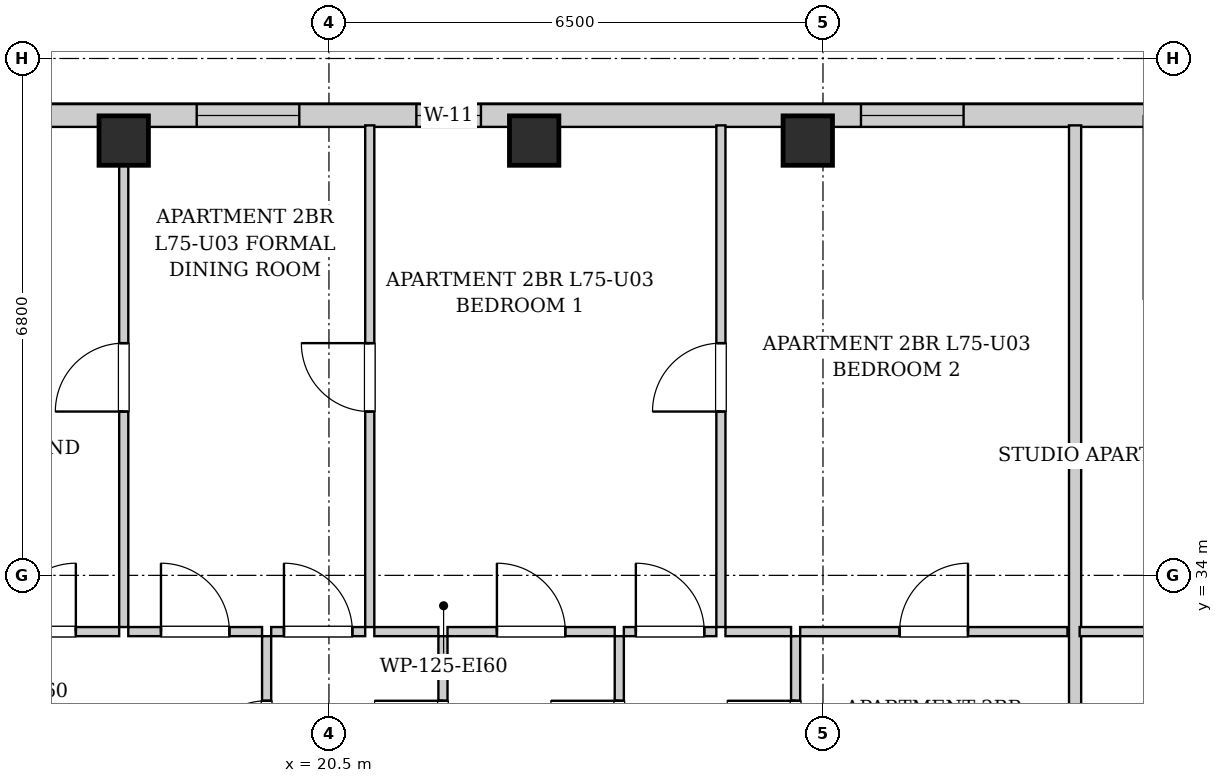
"""IFC4 building model, lengths in metres.
Left out: names, types, materials, properties, quantities, classifications, styles, units other than length and angle.
Written with IfcOpenShell. Run it as: python <this file> out.ifc"""

import sys

from ifc_helpers import new_model, si_unit, direction, frame, frame_2d, origin, origin_2d, place, context, subcontext, project, spatial, rectangle, extrude, element, fill, save


model = new_model("IFC4")
c1 = context("Model", 3, precision=1e-05, world=origin(), true_north=direction((0.0, 1.0)))
c2 = subcontext(c1, "Body", "Model", "MODEL_VIEW")
j1 = project(units=[si_unit("LENGTHUNIT", "METRE"), si_unit("PLANEANGLEUNIT", "RADIAN")], contexts=[c1])
p1 = place(None, origin())
s1 = spatial("IfcSite", under=j1, at=p1, CompositionType="ELEMENT")
p2 = place(p1, origin())
s2 = spatial("IfcBuilding", under=s1, at=p2, CompositionType="ELEMENT")
p3 = place(p2, frame((0.0, 0.0, 258.1)))
s3 = spatial("IfcBuildingStorey", under=s2, at=p3, CompositionType="ELEMENT", Elevation=258.1)
for number, where, z_axis, x_axis in (
    (1, (17.8, 39.72, 0.0), (0.0, 0.0, 1.0), (1.0, 0.0, 0.0)),
    (2, (23.2, 39.72, 0.0), (0.0, 0.0, 1.0), (1.0, 0.0, 0.0)),
    (3, (26.8, 39.72, 0.0), (0.0, 0.0, 1.0), (1.0, 0.0, 0.0)),
):
    element("IfcColumn", number, at=place(p3, frame(where, z_axis=z_axis, x_axis=x_axis)), inside=s3, PredefinedType="COLUMN", context=c2, shape_type="SweptSolid", body=[
        extrude(rectangle(XDim=0.65, YDim=0.65, at=origin_2d()), origin(), (0.0, 0.0, 1.0), 3.4),
    ])
p4 = place(p3, frame((13.1, 40.05, 0.0), z_axis=(0.0, 0.0, 1.0), x_axis=(1.0, 0.0, 0.0)))
e4 = element("IfcWall", 4, at=p4, inside=s3, PredefinedType="SOLIDWALL", context=c2, shape_type="SweptSolid", body=[
    extrude(rectangle(XDim=18.25, YDim=0.3, at=frame_2d((9.125, 0.0))), origin(), (0.0, 0.0, 1.0), 3.05),
])
p5 = place(p4, frame((1.813, 0.0, 0.55)))
e5 = element("IfcOpeningElement", 5, at=p5, cuts=e4, PredefinedType="OPENING", context=c2, shape_type="SweptSolid", body=[
    extrude(rectangle(XDim=1.35, YDim=1.2, at=frame_2d((0.675, 0.6))), frame((0.0, 0.16, 0.0), z_axis=(0.0, -1.0, 0.0), x_axis=(1.0, 0.0, 0.0)), (0.0, 0.0, 1.0), 0.32),
])
p6 = place(p4, frame((5.66, 0.0, 0.55)))
e6 = element("IfcOpeningElement", 6, at=p6, cuts=e4, PredefinedType="OPENING", context=c2, shape_type="SweptSolid", body=[
    extrude(rectangle(XDim=1.35, YDim=1.2, at=frame_2d((0.675, 0.6))), frame((0.0, 0.16, 0.0), z_axis=(0.0, -1.0, 0.0), x_axis=(1.0, 0.0, 0.0)), (0.0, 0.0, 1.0), 0.32),
])
p7 = place(p4, frame((8.55, 0.0, 0.55)))
e7 = element("IfcOpeningElement", 7, at=p7, cuts=e4, PredefinedType="OPENING", context=c2, shape_type="SweptSolid", body=[
    extrude(rectangle(XDim=0.85, YDim=1.2, at=frame_2d((0.425, 0.6))), frame((0.0, 0.16, 0.0), z_axis=(0.0, -1.0, 0.0), x_axis=(1.0, 0.0, 0.0)), (0.0, 0.0, 1.0), 0.32),
])
p8 = place(p4, frame((14.4, 0.0, 0.55)))
e8 = element("IfcOpeningElement", 8, at=p8, cuts=e4, PredefinedType="OPENING", context=c2, shape_type="SweptSolid", body=[
    extrude(rectangle(XDim=1.35, YDim=1.2, at=frame_2d((0.675, 0.6))), frame((0.0, 0.16, 0.0), z_axis=(0.0, -1.0, 0.0), x_axis=(1.0, 0.0, 0.0)), (0.0, 0.0, 1.0), 0.32),
])
p9 = place(p3, frame((19.68, 30.6, 0.0), z_axis=(0.0, 0.0, 1.0), x_axis=(0.0, 1.0, 0.0)))
e9 = element("IfcWall", 9, at=p9, inside=s3, PredefinedType="PARTITIONING", context=c2, shape_type="SweptSolid", body=[
    extrude(rectangle(XDim=2.6, YDim=0.12, at=frame_2d((1.3, 0.0))), origin(), (0.0, 0.0, 1.0), 3.05),
])
p10 = place(p9, frame((0.85, 0.0, 0.0)))
e10 = element("IfcOpeningElement", 10, at=p10, cuts=e9, PredefinedType="OPENING", context=c2, shape_type="SweptSolid", body=[
    extrude(rectangle(XDim=0.9, YDim=2.05, at=frame_2d((0.45, 1.025))), frame((0.0, 0.07, 0.0), z_axis=(0.0, -1.0, 0.0), x_axis=(1.0, 0.0, 0.0)), (0.0, 0.0, 1.0), 0.14),
])
p11 = place(p3, frame((15.7, 33.26, 0.0), z_axis=(0.0, 0.0, 1.0), x_axis=(1.0, 0.0, 0.0)))
e11 = element("IfcWall", 11, at=p11, inside=s3, PredefinedType="PARTITIONING", context=c2, shape_type="SweptSolid", body=[
    extrude(rectangle(XDim=2.04, YDim=0.12, at=frame_2d((1.02, 0.0))), origin(), (0.0, 0.0, 1.0), 3.05),
])
p12 = place(p11, frame((0.57, 0.0, 0.0)))
e12 = element("IfcOpeningElement", 12, at=p12, cuts=e11, PredefinedType="OPENING", context=c2, shape_type="SweptSolid", body=[
    extrude(rectangle(XDim=0.9, YDim=2.05, at=frame_2d((0.45, 1.025))), frame((0.0, 0.07, 0.0), z_axis=(0.0, -1.0, 0.0), x_axis=(1.0, 0.0, 0.0)), (0.0, 0.0, 1.0), 0.14),
])
p13 = place(p3, frame((17.86, 33.26, 0.0), z_axis=(0.0, 0.0, 1.0), x_axis=(1.0, 0.0, 0.0)))
e13 = element("IfcWall", 13, at=p13, inside=s3, PredefinedType="PARTITIONING", context=c2, shape_type="SweptSolid", body=[
    extrude(rectangle(XDim=1.76, YDim=0.12, at=frame_2d((0.88, 0.0))), origin(), (0.0, 0.0, 1.0), 3.05),
])
p14 = place(p13, frame((0.43, 0.0, 0.0)))
e14 = element("IfcOpeningElement", 14, at=p14, cuts=e13, PredefinedType="OPENING", context=c2, shape_type="SweptSolid", body=[
    extrude(rectangle(XDim=0.9, YDim=2.05, at=frame_2d((0.45, 1.025))), frame((0.0, 0.07, 0.0), z_axis=(0.0, -1.0, 0.0), x_axis=(1.0, 0.0, 0.0)), (0.0, 0.0, 1.0), 0.14),
])
p15 = place(p3, frame((22.0, 30.6, 0.0), z_axis=(0.0, 0.0, 1.0), x_axis=(0.0, 1.0, 0.0)))
e15 = element("IfcWall", 15, at=p15, inside=s3, PredefinedType="PARTITIONING", context=c2, shape_type="SweptSolid", body=[
    extrude(rectangle(XDim=2.6, YDim=0.12, at=frame_2d((1.3, 0.0))), origin(), (0.0, 0.0, 1.0), 3.05),
])
p16 = place(p15, frame((0.85, 0.0, 0.0)))
e16 = element("IfcOpeningElement", 16, at=p16, cuts=e15, PredefinedType="OPENING", context=c2, shape_type="SweptSolid", body=[
    extrude(rectangle(XDim=0.9, YDim=2.05, at=frame_2d((0.45, 1.025))), frame((0.0, 0.07, 0.0), z_axis=(0.0, -1.0, 0.0), x_axis=(1.0, 0.0, 0.0)), (0.0, 0.0, 1.0), 0.14),
])
p17 = place(p3, frame((19.74, 33.26, 0.0), z_axis=(0.0, 0.0, 1.0), x_axis=(1.0, 0.0, 0.0)))
e17 = element("IfcWall", 17, at=p17, inside=s3, PredefinedType="PARTITIONING", context=c2, shape_type="SweptSolid", body=[
    extrude(rectangle(XDim=1.237, YDim=0.12, at=frame_2d((0.619, 0.0))), origin(), (0.0, 0.0, 1.0), 3.05),
])
p18 = place(p17, frame((0.168, 0.0, 0.0)))
e18 = element("IfcOpeningElement", 18, at=p18, cuts=e17, PredefinedType="OPENING", context=c2, shape_type="SweptSolid", body=[
    extrude(rectangle(XDim=0.9, YDim=2.05, at=frame_2d((0.45, 1.025))), frame((0.0, 0.07, 0.0), z_axis=(0.0, -1.0, 0.0), x_axis=(1.0, 0.0, 0.0)), (0.0, 0.0, 1.0), 0.14),
])
p19 = place(p3, frame((21.097, 33.26, 0.0), z_axis=(0.0, 0.0, 1.0), x_axis=(1.0, 0.0, 0.0)))
e19 = element("IfcWall", 19, at=p19, inside=s3, PredefinedType="PARTITIONING", context=c2, shape_type="SweptSolid", body=[
    extrude(rectangle(XDim=0.843, YDim=0.12, at=frame_2d((0.421, 0.0))), origin(), (0.0, 0.0, 1.0), 3.05),
])
p20 = place(p3, frame((24.32, 30.6, 0.0), z_axis=(0.0, 0.0, 1.0), x_axis=(0.0, 1.0, 0.0)))
e20 = element("IfcWall", 20, at=p20, inside=s3, PredefinedType="PARTITIONING", context=c2, shape_type="SweptSolid", body=[
    extrude(rectangle(XDim=2.6, YDim=0.12, at=frame_2d((1.3, 0.0))), origin(), (0.0, 0.0, 1.0), 3.05),
])
p21 = place(p20, frame((0.85, 0.0, 0.0)))
e21 = element("IfcOpeningElement", 21, at=p21, cuts=e20, PredefinedType="OPENING", context=c2, shape_type="SweptSolid", body=[
    extrude(rectangle(XDim=0.9, YDim=2.05, at=frame_2d((0.45, 1.025))), frame((0.0, 0.07, 0.0), z_axis=(0.0, -1.0, 0.0), x_axis=(1.0, 0.0, 0.0)), (0.0, 0.0, 1.0), 0.14),
])
p22 = place(p3, frame((22.06, 33.26, 0.0), z_axis=(0.0, 0.0, 1.0), x_axis=(1.0, 0.0, 0.0)))
e22 = element("IfcWall", 22, at=p22, inside=s3, PredefinedType="PARTITIONING", context=c2, shape_type="SweptSolid", body=[
    extrude(rectangle(XDim=2.2, YDim=0.12, at=frame_2d((1.1, 0.0))), origin(), (0.0, 0.0, 1.0), 3.05),
])
p23 = place(p22, frame((0.65, 0.0, 0.0)))
e23 = element("IfcOpeningElement", 23, at=p23, cuts=e22, PredefinedType="OPENING", context=c2, shape_type="SweptSolid", body=[
    extrude(rectangle(XDim=0.9, YDim=2.05, at=frame_2d((0.45, 1.025))), frame((0.0, 0.07, 0.0), z_axis=(0.0, -1.0, 0.0), x_axis=(1.0, 0.0, 0.0)), (0.0, 0.0, 1.0), 0.14),
])
p24 = place(p3, frame((26.64, 30.6, 0.0), z_axis=(0.0, 0.0, 1.0), x_axis=(0.0, 1.0, 0.0)))
e24 = element("IfcWall", 24, at=p24, inside=s3, PredefinedType="PARTITIONING", context=c2, shape_type="SweptSolid", body=[
    extrude(rectangle(XDim=2.6, YDim=0.12, at=frame_2d((1.3, 0.0))), origin(), (0.0, 0.0, 1.0), 3.05),
])
p25 = place(p24, frame((0.85, 0.0, 0.0)))
e25 = element("IfcOpeningElement", 25, at=p25, cuts=e24, PredefinedType="OPENING", context=c2, shape_type="SweptSolid", body=[
    extrude(rectangle(XDim=0.9, YDim=2.05, at=frame_2d((0.45, 1.025))), frame((0.0, 0.07, 0.0), z_axis=(0.0, -1.0, 0.0), x_axis=(1.0, 0.0, 0.0)), (0.0, 0.0, 1.0), 0.14),
])
p26 = place(p3, frame((24.38, 33.26, 0.0), z_axis=(0.0, 0.0, 1.0), x_axis=(1.0, 0.0, 0.0)))
e26 = element("IfcWall", 26, at=p26, inside=s3, PredefinedType="PARTITIONING", context=c2, shape_type="SweptSolid", body=[
    extrude(rectangle(XDim=1.217, YDim=0.12, at=frame_2d((0.608, 0.0))), origin(), (0.0, 0.0, 1.0), 3.05),
])
p27 = place(p26, frame((0.158, 0.0, 0.0)))
e27 = element("IfcOpeningElement", 27, at=p27, cuts=e26, PredefinedType="OPENING", context=c2, shape_type="SweptSolid", body=[
    extrude(rectangle(XDim=0.9, YDim=2.05, at=frame_2d((0.45, 1.025))), frame((0.0, 0.07, 0.0), z_axis=(0.0, -1.0, 0.0), x_axis=(1.0, 0.0, 0.0)), (0.0, 0.0, 1.0), 0.14),
])
p28 = place(p3, frame((25.717, 33.26, 0.0), z_axis=(0.0, 0.0, 1.0), x_axis=(1.0, 0.0, 0.0)))
e28 = element("IfcWall", 28, at=p28, inside=s3, PredefinedType="PARTITIONING", context=c2, shape_type="SweptSolid", body=[
    extrude(rectangle(XDim=0.863, YDim=0.12, at=frame_2d((0.432, 0.0))), origin(), (0.0, 0.0, 1.0), 3.05),
])
p29 = place(p3, frame((26.7, 33.26, 0.0), z_axis=(0.0, 0.0, 1.0), x_axis=(1.0, 0.0, 0.0)))
e29 = element("IfcWall", 29, at=p29, inside=s3, PredefinedType="PARTITIONING", context=c2, shape_type="SweptSolid", body=[
    extrude(rectangle(XDim=3.517, YDim=0.12, at=frame_2d((1.759, 0.0))), origin(), (0.0, 0.0, 1.0), 3.05),
])
p30 = place(p29, frame((1.308, 0.0, 0.0)))
e30 = element("IfcOpeningElement", 30, at=p30, cuts=e29, PredefinedType="OPENING", context=c2, shape_type="SweptSolid", body=[
    extrude(rectangle(XDim=0.9, YDim=2.05, at=frame_2d((0.45, 1.025))), frame((0.0, 0.07, 0.0), z_axis=(0.0, -1.0, 0.0), x_axis=(1.0, 0.0, 0.0)), (0.0, 0.0, 1.0), 0.14),
])
p31 = place(p3, frame((17.8, 33.32, 0.0), z_axis=(0.0, 0.0, 1.0), x_axis=(0.0, 1.0, 0.0)))
e31 = element("IfcWall", 31, at=p31, inside=s3, PredefinedType="PARTITIONING", context=c2, shape_type="SweptSolid", body=[
    extrude(rectangle(XDim=6.6, YDim=0.12, at=frame_2d((3.3, 0.0))), origin(), (0.0, 0.0, 1.0), 2.578),
])
p32 = place(p31, frame((2.835, 0.0, 0.0)))
e32 = element("IfcOpeningElement", 32, at=p32, cuts=e31, PredefinedType="OPENING", context=c2, shape_type="SweptSolid", body=[
    extrude(rectangle(XDim=0.9, YDim=2.05, at=frame_2d((0.45, 1.025))), frame((0.0, 0.07, 0.0), z_axis=(0.0, -1.0, 0.0), x_axis=(1.0, 0.0, 0.0)), (0.0, 0.0, 1.0), 0.14),
])
p33 = place(p3, frame((21.037, 33.32, 0.0), z_axis=(0.0, 0.0, 1.0), x_axis=(0.0, 1.0, 0.0)))
e33 = element("IfcWall", 33, at=p33, inside=s3, PredefinedType="PARTITIONING", context=c2, shape_type="SweptSolid", body=[
    extrude(rectangle(XDim=6.6, YDim=0.12, at=frame_2d((3.3, 0.0))), origin(), (0.0, 0.0, 1.0), 3.05),
])
p34 = place(p33, frame((2.835, 0.0, 0.0)))
e34 = element("IfcOpeningElement", 34, at=p34, cuts=e33, PredefinedType="OPENING", context=c2, shape_type="SweptSolid", body=[
    extrude(rectangle(XDim=0.9, YDim=2.05, at=frame_2d((0.45, 1.025))), frame((0.0, 0.07, 0.0), z_axis=(0.0, -1.0, 0.0), x_axis=(1.0, 0.0, 0.0)), (0.0, 0.0, 1.0), 0.14),
])
p35 = place(p3, frame((25.657, 33.32, 0.0), z_axis=(0.0, 0.0, 1.0), x_axis=(0.0, 1.0, 0.0)))
e35 = element("IfcWall", 35, at=p35, inside=s3, PredefinedType="PARTITIONING", context=c2, shape_type="SweptSolid", body=[
    extrude(rectangle(XDim=6.6, YDim=0.12, at=frame_2d((3.3, 0.0))), origin(), (0.0, 0.0, 1.0), 3.05),
])
p36 = place(p35, frame((2.835, 0.0, 0.0)))
e36 = element("IfcOpeningElement", 36, at=p36, cuts=e35, PredefinedType="OPENING", context=c2, shape_type="SweptSolid", body=[
    extrude(rectangle(XDim=0.9, YDim=2.05, at=frame_2d((0.45, 1.025))), frame((0.0, 0.07, 0.0), z_axis=(0.0, -1.0, 0.0), x_axis=(1.0, 0.0, 0.0)), (0.0, 0.0, 1.0), 0.14),
])
p37 = place(p3, frame((30.317, 30.6, 0.0), z_axis=(0.0, 0.0, 1.0), x_axis=(0.0, 1.0, 0.0)))
e37 = element("IfcWall", 37, at=p37, inside=s3, PredefinedType="PARTITIONING", context=c2, shape_type="SweptSolid", body=[
    extrude(rectangle(XDim=9.32, YDim=0.16, at=frame_2d((4.66, 0.0))), origin(), (0.0, 0.0, 1.0), 3.05),
])
p38 = place(p3, frame((30.377, 33.26, 0.0), z_axis=(0.0, 0.0, 1.0), x_axis=(1.0, 0.0, 0.0)))
e38 = element("IfcWall", 38, at=p38, inside=s3, PredefinedType="PARTITIONING", context=c2, shape_type="SweptSolid", body=[
    extrude(rectangle(XDim=2.203, YDim=0.12, at=frame_2d((1.102, 0.0))), origin(), (0.0, 0.0, 1.0), 3.05),
])
p39 = place(p10, origin())
e39 = element("IfcDoor", 39, at=p39, inside=s3, OperationType="SINGLE_SWING_LEFT", PredefinedType="DOOR", context=c2, shape_type="SweptSolid", body=[
    extrude(rectangle(XDim=0.9, YDim=2.05, at=frame_2d((0.45, 1.025))), frame((0.0, 0.025, 0.0), z_axis=(0.0, -1.0, 0.0), x_axis=(1.0, 0.0, 0.0)), (0.0, 0.0, 1.0), 0.05),
])
fill(e10, e39)
p40 = place(p12, origin())
e40 = element("IfcDoor", 40, at=p40, inside=s3, OperationType="SINGLE_SWING_RIGHT", PredefinedType="DOOR", context=c2, shape_type="SweptSolid", body=[
    extrude(rectangle(XDim=0.9, YDim=2.05, at=frame_2d((0.45, 1.025))), frame((0.0, 0.025, 0.0), z_axis=(0.0, -1.0, 0.0), x_axis=(1.0, 0.0, 0.0)), (0.0, 0.0, 1.0), 0.05),
])
fill(e12, e40)
p41 = place(p14, origin())
e41 = element("IfcDoor", 41, at=p41, inside=s3, OperationType="SINGLE_SWING_LEFT", PredefinedType="DOOR", context=c2, shape_type="SweptSolid", body=[
    extrude(rectangle(XDim=0.9, YDim=2.05, at=frame_2d((0.45, 1.025))), frame((0.0, 0.025, 0.0), z_axis=(0.0, -1.0, 0.0), x_axis=(1.0, 0.0, 0.0)), (0.0, 0.0, 1.0), 0.05),
])
fill(e14, e41)
p42 = place(p16, origin())
e42 = element("IfcDoor", 42, at=p42, inside=s3, OperationType="SINGLE_SWING_RIGHT", PredefinedType="DOOR", context=c2, shape_type="SweptSolid", body=[
    extrude(rectangle(XDim=0.9, YDim=2.05, at=frame_2d((0.45, 1.025))), frame((0.0, 0.025, 0.0), z_axis=(0.0, -1.0, 0.0), x_axis=(1.0, 0.0, 0.0)), (0.0, 0.0, 1.0), 0.05),
])
fill(e16, e42)
p43 = place(p18, origin())
e43 = element("IfcDoor", 43, at=p43, inside=s3, OperationType="SINGLE_SWING_LEFT", PredefinedType="DOOR", context=c2, shape_type="SweptSolid", body=[
    extrude(rectangle(XDim=0.9, YDim=2.05, at=frame_2d((0.45, 1.025))), frame((0.0, 0.025, 0.0), z_axis=(0.0, -1.0, 0.0), x_axis=(1.0, 0.0, 0.0)), (0.0, 0.0, 1.0), 0.05),
])
fill(e18, e43)
p44 = place(p21, origin())
e44 = element("IfcDoor", 44, at=p44, inside=s3, OperationType="SINGLE_SWING_RIGHT", PredefinedType="DOOR", context=c2, shape_type="SweptSolid", body=[
    extrude(rectangle(XDim=0.9, YDim=2.05, at=frame_2d((0.45, 1.025))), frame((0.0, 0.025, 0.0), z_axis=(0.0, -1.0, 0.0), x_axis=(1.0, 0.0, 0.0)), (0.0, 0.0, 1.0), 0.05),
])
fill(e21, e44)
p45 = place(p23, origin())
e45 = element("IfcDoor", 45, at=p45, inside=s3, OperationType="SINGLE_SWING_LEFT", PredefinedType="DOOR", context=c2, shape_type="SweptSolid", body=[
    extrude(rectangle(XDim=0.9, YDim=2.05, at=frame_2d((0.45, 1.025))), frame((0.0, 0.025, 0.0), z_axis=(0.0, -1.0, 0.0), x_axis=(1.0, 0.0, 0.0)), (0.0, 0.0, 1.0), 0.05),
])
fill(e23, e45)
p46 = place(p25, origin())
e46 = element("IfcDoor", 46, at=p46, inside=s3, OperationType="SINGLE_SWING_RIGHT", PredefinedType="DOOR", context=c2, shape_type="SweptSolid", body=[
    extrude(rectangle(XDim=0.9, YDim=2.05, at=frame_2d((0.45, 1.025))), frame((0.0, 0.025, 0.0), z_axis=(0.0, -1.0, 0.0), x_axis=(1.0, 0.0, 0.0)), (0.0, 0.0, 1.0), 0.05),
])
fill(e25, e46)
p47 = place(p27, origin())
e47 = element("IfcDoor", 47, at=p47, inside=s3, OperationType="SINGLE_SWING_LEFT", PredefinedType="DOOR", context=c2, shape_type="SweptSolid", body=[
    extrude(rectangle(XDim=0.9, YDim=2.05, at=frame_2d((0.45, 1.025))), frame((0.0, 0.025, 0.0), z_axis=(0.0, -1.0, 0.0), x_axis=(1.0, 0.0, 0.0)), (0.0, 0.0, 1.0), 0.05),
])
fill(e27, e47)
p48 = place(p30, origin())
e48 = element("IfcDoor", 48, at=p48, inside=s3, OperationType="SINGLE_SWING_RIGHT", PredefinedType="DOOR", context=c2, shape_type="SweptSolid", body=[
    extrude(rectangle(XDim=0.9, YDim=2.05, at=frame_2d((0.45, 1.025))), frame((0.0, 0.025, 0.0), z_axis=(0.0, -1.0, 0.0), x_axis=(1.0, 0.0, 0.0)), (0.0, 0.0, 1.0), 0.05),
])
fill(e30, e48)
p49 = place(p32, origin())
e49 = element("IfcDoor", 49, at=p49, inside=s3, OperationType="SINGLE_SWING_LEFT", PredefinedType="DOOR", context=c2, shape_type="SweptSolid", body=[
    extrude(rectangle(XDim=0.9, YDim=2.05, at=frame_2d((0.45, 1.025))), frame((0.0, 0.025, 0.0), z_axis=(0.0, -1.0, 0.0), x_axis=(1.0, 0.0, 0.0)), (0.0, 0.0, 1.0), 0.05),
])
fill(e32, e49)
p50 = place(p34, origin())
e50 = element("IfcDoor", 50, at=p50, inside=s3, OperationType="SINGLE_SWING_RIGHT", PredefinedType="DOOR", context=c2, shape_type="SweptSolid", body=[
    extrude(rectangle(XDim=0.9, YDim=2.05, at=frame_2d((0.45, 1.025))), frame((0.0, 0.025, 0.0), z_axis=(0.0, -1.0, 0.0), x_axis=(1.0, 0.0, 0.0)), (0.0, 0.0, 1.0), 0.05),
])
fill(e34, e50)
p51 = place(p36, origin())
e51 = element("IfcDoor", 51, at=p51, inside=s3, OperationType="SINGLE_SWING_LEFT", PredefinedType="DOOR", context=c2, shape_type="SweptSolid", body=[
    extrude(rectangle(XDim=0.9, YDim=2.05, at=frame_2d((0.45, 1.025))), frame((0.0, 0.025, 0.0), z_axis=(0.0, -1.0, 0.0), x_axis=(1.0, 0.0, 0.0)), (0.0, 0.0, 1.0), 0.05),
])
fill(e36, e51)
p52 = place(p6, origin())
e52 = element("IfcWindow", 52, at=p52, inside=s3, PartitioningType="SINGLE_PANEL", PredefinedType="WINDOW", context=c2, shape_type="SweptSolid", body=[
    extrude(rectangle(XDim=1.35, YDim=1.2, at=frame_2d((0.675, 0.6))), frame((0.0, 0.03, 0.0), z_axis=(0.0, -1.0, 0.0), x_axis=(1.0, 0.0, 0.0)), (0.0, 0.0, 1.0), 0.06),
])
fill(e6, e52)
p53 = place(p7, origin())
e53 = element("IfcWindow", 53, at=p53, inside=s3, PartitioningType="SINGLE_PANEL", PredefinedType="WINDOW", context=c2, shape_type="SweptSolid", body=[
    extrude(rectangle(XDim=0.85, YDim=1.2, at=frame_2d((0.425, 0.6))), frame((0.0, 0.03, 0.0), z_axis=(0.0, -1.0, 0.0), x_axis=(1.0, 0.0, 0.0)), (0.0, 0.0, 1.0), 0.06),
])
fill(e7, e53)
p54 = place(p8, origin())
e54 = element("IfcWindow", 54, at=p54, inside=s3, PartitioningType="SINGLE_PANEL", PredefinedType="WINDOW", context=c2, shape_type="SweptSolid", body=[
    extrude(rectangle(XDim=1.35, YDim=1.2, at=frame_2d((0.675, 0.6))), frame((0.0, 0.03, 0.0), z_axis=(0.0, -1.0, 0.0), x_axis=(1.0, 0.0, 0.0)), (0.0, 0.0, 1.0), 0.06),
])
fill(e8, e54)
save(model, sys.argv[1])
